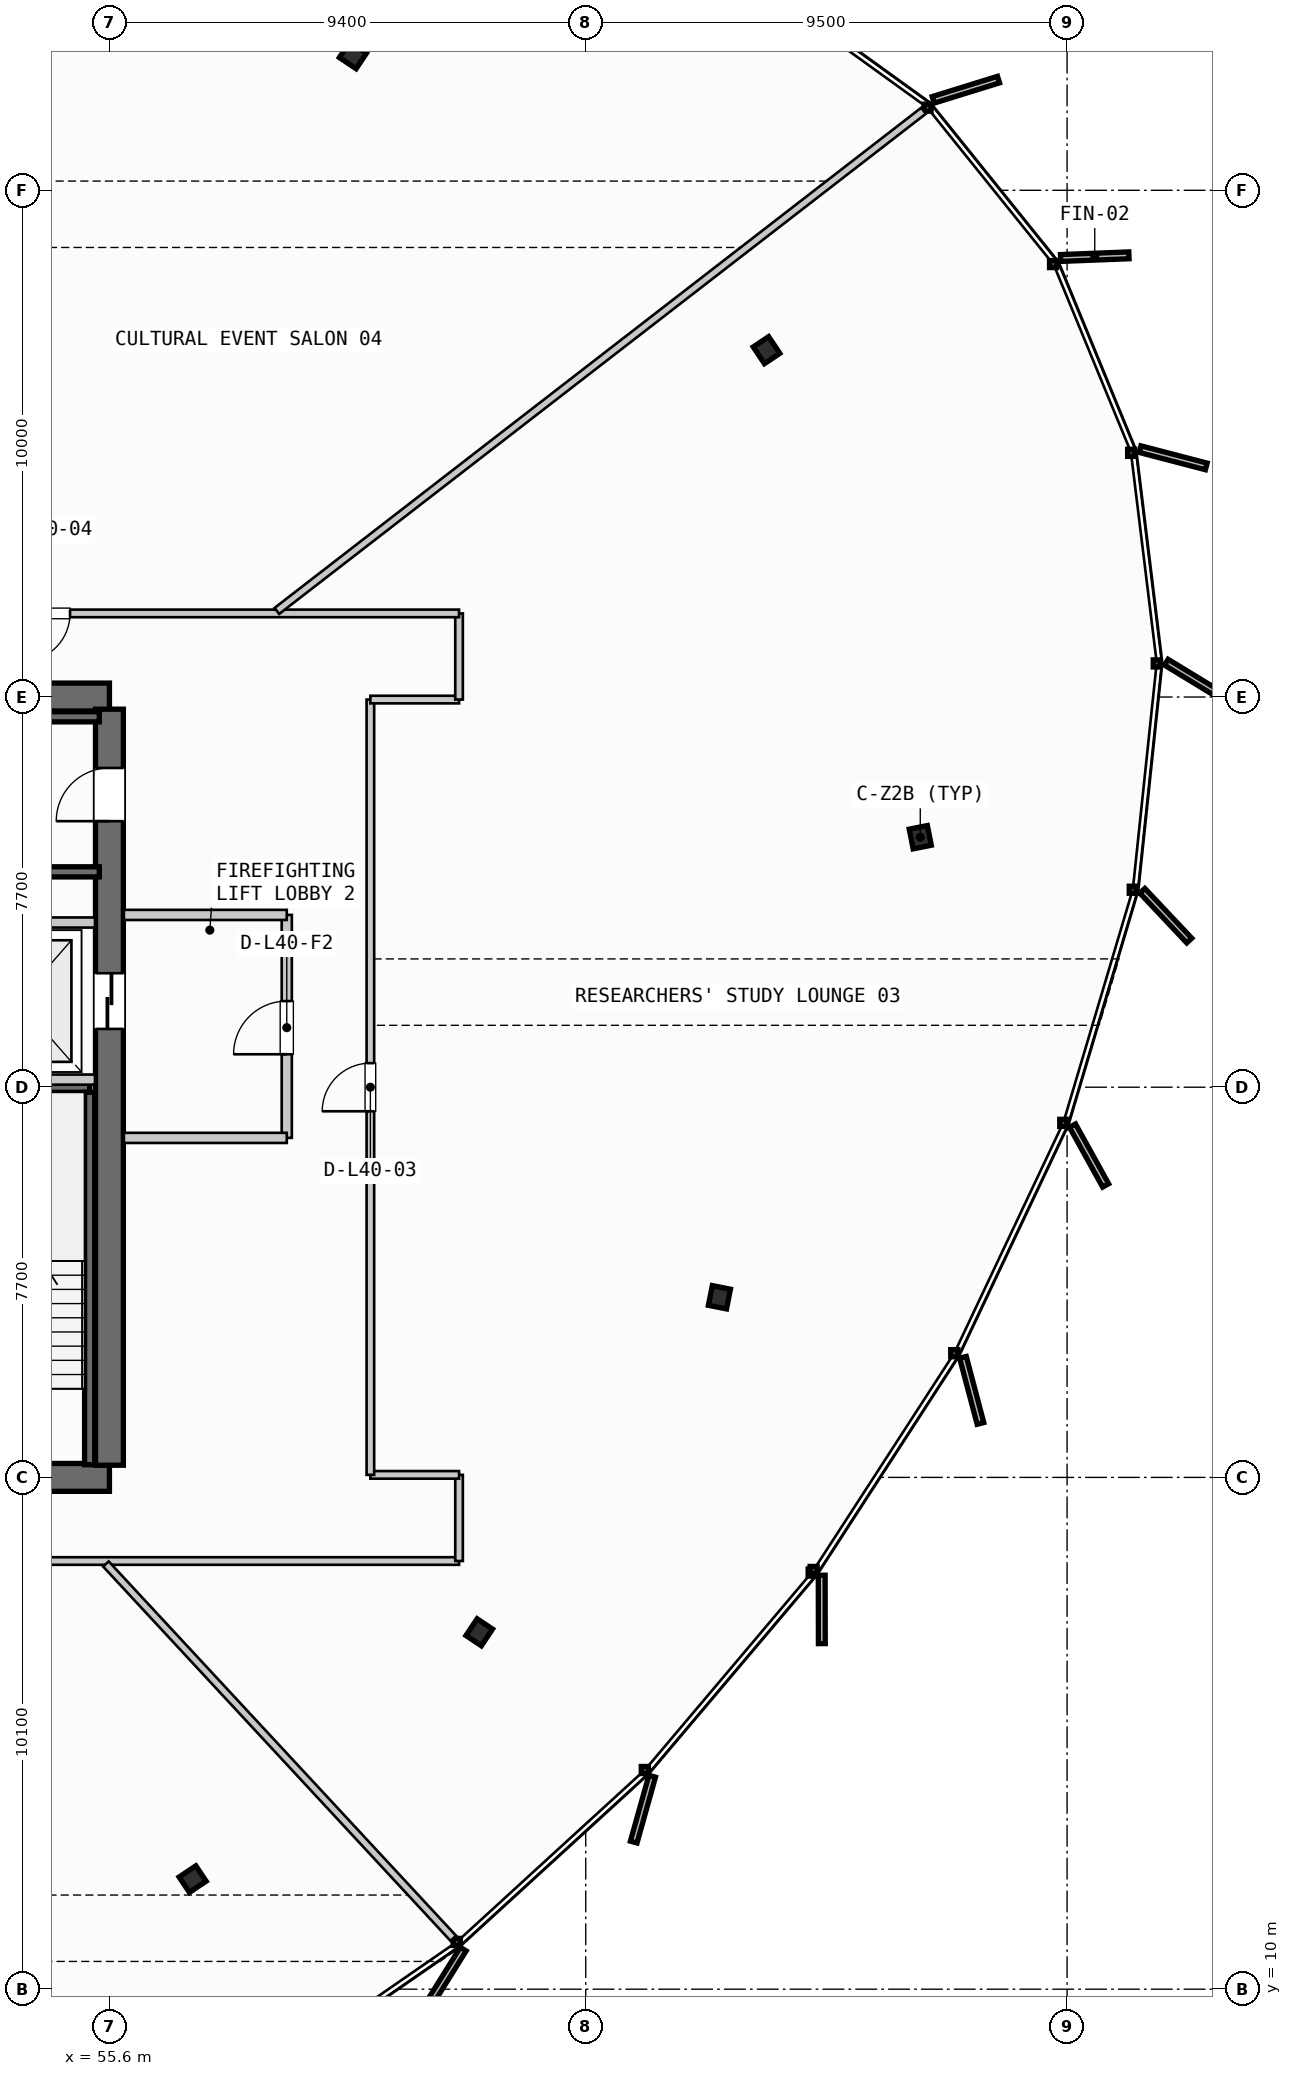
"""IFC4 building model, lengths in metres.
Left out: names, types, materials, properties, quantities, classifications, styles, units other than length and angle.
Written with IfcOpenShell. Run it as: python <this file> out.ifc"""

import sys

from ifc_helpers import new_model, si_unit, direction, frame, frame_2d, origin, origin_2d, place, context, subcontext, project, spatial, rectangle, i_section, extrude, source, transform, mapped, element, fill, save


model = new_model("IFC4")
c1 = context("Model", 3, precision=1e-05, world=origin(), true_north=direction((0.0, 1.0)))
c2 = subcontext(c1, "Body", "Model", "MODEL_VIEW")
j1 = project(units=[si_unit("LENGTHUNIT", "METRE"), si_unit("PLANEANGLEUNIT", "RADIAN")], contexts=[c1])
p1 = place(None, origin())
s1 = spatial("IfcSite", under=j1, at=p1, CompositionType="ELEMENT")
p2 = place(p1, origin())
s2 = spatial("IfcBuilding", under=s1, at=p2, CompositionType="ELEMENT")
p3 = place(p2, frame((0.0, 0.0, 157.2)))
s3 = spatial("IfcBuildingStorey", under=s2, at=p3, CompositionType="ELEMENT", Elevation=157.2)
p4 = place(p3, frame((38.0, 20.1, 0.0), z_axis=(0.0, 0.0, 1.0), x_axis=(1.0, 0.0, 0.0)))
e1 = element("IfcWall", 1, at=p4, inside=s3, PredefinedType="SHEAR", context=c2, shape_type="SweptSolid", body=[
    extrude(rectangle(XDim=17.6, YDim=0.55, at=frame_2d((8.8, 0.0))), origin(), (0.0, 0.0, 1.0), 3.3),
])
p5 = place(p4, frame((1.4, 0.0, 0.0)))
e2 = element("IfcOpeningElement", 2, at=p5, cuts=e1, PredefinedType="OPENING", context=c2, shape_type="SweptSolid", body=[
    extrude(rectangle(XDim=1.05, YDim=2.15, at=frame_2d((0.525, 1.075))), frame((0.0, 0.285, 0.0), z_axis=(0.0, -1.0, 0.0), x_axis=(1.0, 0.0, 0.0)), (0.0, 0.0, 1.0), 0.57),
])
p6 = place(p4, frame((15.15, 0.0, 0.0)))
e3 = element("IfcOpeningElement", 3, at=p6, cuts=e1, PredefinedType="OPENING", context=c2, shape_type="SweptSolid", body=[
    extrude(rectangle(XDim=1.05, YDim=2.15, at=frame_2d((0.525, 1.075))), frame((0.0, 0.285, 0.0), z_axis=(0.0, -1.0, 0.0), x_axis=(1.0, 0.0, 0.0)), (0.0, 0.0, 1.0), 0.57),
])
p7 = place(p4, frame((5.25, 0.0, 0.0)))
e4 = element("IfcOpeningElement", 4, at=p7, cuts=e1, PredefinedType="OPENING", context=c2, shape_type="SweptSolid", body=[
    extrude(rectangle(XDim=0.95, YDim=2.15, at=frame_2d((0.475, 1.075))), frame((0.0, 0.285, 0.0), z_axis=(0.0, -1.0, 0.0), x_axis=(1.0, 0.0, 0.0)), (0.0, 0.0, 1.0), 0.57),
])
p8 = place(p4, frame((11.4, 0.0, 0.0)))
e5 = element("IfcOpeningElement", 5, at=p8, cuts=e1, PredefinedType="OPENING", context=c2, shape_type="SweptSolid", body=[
    extrude(rectangle(XDim=0.95, YDim=2.15, at=frame_2d((0.475, 1.075))), frame((0.0, 0.285, 0.0), z_axis=(0.0, -1.0, 0.0), x_axis=(1.0, 0.0, 0.0)), (0.0, 0.0, 1.0), 0.57),
])
p9 = place(p3, frame((55.6, 35.5, 0.0), z_axis=(0.0, 0.0, 1.0), x_axis=(-1.0, 0.0, 0.0)))
e6 = element("IfcWall", 6, at=p9, inside=s3, PredefinedType="SHEAR", context=c2, shape_type="SweptSolid", body=[
    extrude(rectangle(XDim=17.6, YDim=0.55, at=frame_2d((8.8, 0.0))), origin(), (0.0, 0.0, 1.0), 3.3),
])
p10 = place(p9, frame((8.05, 0.0, 0.0)))
e7 = element("IfcOpeningElement", 7, at=p10, cuts=e6, PredefinedType="OPENING", context=c2, shape_type="SweptSolid", body=[
    extrude(rectangle(XDim=1.5, YDim=2.2, at=frame_2d((0.75, 1.1))), frame((0.0, 0.285, 0.0), z_axis=(0.0, -1.0, 0.0), x_axis=(1.0, 0.0, 0.0)), (0.0, 0.0, 1.0), 0.57),
])
p11 = place(p9, frame((14.95, 0.0, 0.0)))
e8 = element("IfcOpeningElement", 8, at=p11, cuts=e6, PredefinedType="OPENING", context=c2, shape_type="SweptSolid", body=[
    extrude(rectangle(XDim=1.4, YDim=2.3, at=frame_2d((0.7, 1.15))), frame((0.0, 0.285, 0.0), z_axis=(0.0, -1.0, 0.0), x_axis=(1.0, 0.0, 0.0)), (0.0, 0.0, 1.0), 0.57),
])
p12 = place(p9, frame((12.6, 0.0, 0.0)))
e9 = element("IfcOpeningElement", 9, at=p12, cuts=e6, PredefinedType="OPENING", context=c2, shape_type="SweptSolid", body=[
    extrude(rectangle(XDim=0.95, YDim=2.15, at=frame_2d((0.475, 1.075))), frame((0.0, 0.285, 0.0), z_axis=(0.0, -1.0, 0.0), x_axis=(1.0, 0.0, 0.0)), (0.0, 0.0, 1.0), 0.57),
])
p13 = place(p9, frame((10.45, 0.0, 0.0)))
e10 = element("IfcOpeningElement", 10, at=p13, cuts=e6, PredefinedType="OPENING", context=c2, shape_type="SweptSolid", body=[
    extrude(rectangle(XDim=0.95, YDim=2.15, at=frame_2d((0.475, 1.075))), frame((0.0, 0.285, 0.0), z_axis=(0.0, -1.0, 0.0), x_axis=(1.0, 0.0, 0.0)), (0.0, 0.0, 1.0), 0.57),
])
p14 = place(p3, frame((55.6, 20.34, 0.0), z_axis=(0.0, 0.0, 1.0), x_axis=(0.0, 1.0, 0.0)))
e11 = element("IfcWall", 11, at=p14, inside=s3, PredefinedType="SHEAR", context=c2, shape_type="SweptSolid", body=[
    extrude(rectangle(XDim=14.92, YDim=0.55, at=frame_2d((7.46, 0.0))), origin(), (0.0, 0.0, 1.0), 3.3),
])
p15 = place(p14, frame((12.71, 0.0, 0.0)))
e12 = element("IfcOpeningElement", 12, at=p15, cuts=e11, PredefinedType="OPENING", context=c2, shape_type="SweptSolid", body=[
    extrude(rectangle(XDim=1.05, YDim=2.15, at=frame_2d((0.525, 1.075))), frame((0.0, 0.285, 0.0), z_axis=(0.0, -1.0, 0.0), x_axis=(1.0, 0.0, 0.0)), (0.0, 0.0, 1.0), 0.57),
])
p16 = place(p14, frame((8.61, 0.0, 0.0)))
e13 = element("IfcOpeningElement", 13, at=p16, cuts=e11, PredefinedType="OPENING", context=c2, shape_type="SweptSolid", body=[
    extrude(rectangle(XDim=1.1, YDim=2.2, at=frame_2d((0.55, 1.1))), frame((0.0, 0.285, 0.0), z_axis=(0.0, -1.0, 0.0), x_axis=(1.0, 0.0, 0.0)), (0.0, 0.0, 1.0), 0.57),
])
m1 = source(origin(), c2, "Body", "SweptSolid", [
    extrude(i_section(OverallWidth=0.397, OverallDepth=0.365, WebThickness=0.028, FlangeThickness=0.044, FilletRadius=0.015, at=origin_2d()), origin(), (0.0, 0.0, 1.0), 3.3),
])
for number, where, z_axis, x_axis in (
    (14, (71.603, 32.733, 0.0), (0.0, 0.0, 1.0), (0.981, 0.195, 0.0)),
    (15, (68.569, 42.345, 0.0), (0.0, 0.0, 1.0), (0.831, 0.556, 0.0)),
    (16, (60.405, 48.161, 0.0), (0.0, 0.0, 1.0), (0.556, 0.831, 0.0)),
    (17, (57.242, 12.172, 0.0), (0.0, 0.0, 1.0), (0.556, -0.831, 0.0)),
    (18, (62.899, 17.043, 0.0), (0.0, 0.0, 1.0), (0.831, -0.556, 0.0)),
    (19, (67.639, 23.655, 0.0), (0.0, 0.0, 1.0), (0.981, -0.195, 0.0)),
):
    element("IfcColumn", number, at=place(p3, frame(where, z_axis=z_axis, x_axis=x_axis)), inside=s3, PredefinedType="COLUMN", context=c2, shape_type="MappedRepresentation", body=[
        mapped(m1, transform((0.0, 0.0, 0.0), scale=1.0)),
    ])
p17 = place(p3, frame((52.15, 27.8, 0.0), z_axis=(0.0, 0.0, 1.0), x_axis=(1.0, 0.0, 0.0)))
e20 = element("IfcWall", 20, at=p17, inside=s3, PredefinedType="SHEAR", context=c2, shape_type="SweptSolid", body=[
    extrude(rectangle(XDim=3.06, YDim=0.2, at=frame_2d((1.53, 0.0))), origin(), (0.0, 0.0, 1.0), 3.3),
])
for number, where, z_axis, x_axis in (
    (21, (55.21, 27.7, 0.0), (0.0, 0.0, 1.0), (0.0, -1.0, 0.0)),
    (22, (48.05, 35.11, 0.0), (0.0, 0.0, 1.0), (1.0, 0.0, 0.0)),
    (23, (55.4, 32.05, 0.0), (0.0, 0.0, 1.0), (-1.0, 0.0, 0.0)),
):
    element("IfcWall", number, at=place(p3, frame(where, z_axis=z_axis, x_axis=x_axis)), inside=s3, PredefinedType="SHEAR", context=c2, shape_type="SweptSolid", body=[
        extrude(rectangle(XDim=7.35, YDim=0.2, at=frame_2d((3.675, 0.0))), origin(), (0.0, 0.0, 1.0), 3.3),
    ])
for number, where, z_axis, x_axis in (
    (24, (52.45, 27.95, 0.0), (0.0, 0.0, 1.0), (1.0, 0.0, 0.0)),
    (25, (52.45, 31.05, 0.0), (0.0, 0.0, 1.0), (1.0, 0.0, 0.0)),
):
    element("IfcWall", number, at=place(p3, frame(where, z_axis=z_axis, x_axis=x_axis)), inside=s3, PredefinedType="PARTITIONING", context=c2, shape_type="SweptSolid", body=[
        extrude(rectangle(XDim=2.865, YDim=0.2, at=frame_2d((1.433, 0.0))), origin(), (0.0, 0.0, 1.0), 2.28),
    ])
p18 = place(p3, frame((59.1, 26.8, 0.0), z_axis=(0.0, 0.0, 1.0), x_axis=(0.0, 1.0, 0.0)))
e26 = element("IfcWall", 26, at=p18, inside=s3, PredefinedType="PARTITIONING", context=c2, shape_type="SweptSolid", body=[
    extrude(rectangle(XDim=4.4, YDim=0.2, at=frame_2d((2.2, 0.0))), origin(), (0.0, 0.0, 1.0), 2.28),
])
p19 = place(p18, frame((1.65, 0.0, 0.0)))
e27 = element("IfcOpeningElement", 27, at=p19, cuts=e26, PredefinedType="OPENING", context=c2, shape_type="SweptSolid", body=[
    extrude(rectangle(XDim=1.05, YDim=2.15, at=frame_2d((0.525, 1.075))), frame((0.0, 0.11, 0.0), z_axis=(0.0, -1.0, 0.0), x_axis=(1.0, 0.0, 0.0)), (0.0, 0.0, 1.0), 0.22),
])
for number, where, z_axis, x_axis in (
    (28, (55.885, 26.8, 0.0), (0.0, 0.0, 1.0), (1.0, 0.0, 0.0)),
    (29, (55.885, 31.2, 0.0), (0.0, 0.0, 1.0), (1.0, 0.0, 0.0)),
):
    element("IfcWall", number, at=place(p3, frame(where, z_axis=z_axis, x_axis=x_axis)), inside=s3, PredefinedType="PARTITIONING", context=c2, shape_type="SweptSolid", body=[
        extrude(rectangle(XDim=3.215, YDim=0.2, at=frame_2d((1.607, 0.0))), origin(), (0.0, 0.0, 1.0), 2.28),
    ])
p20 = place(p3, frame((31.1, 18.45, 0.0), z_axis=(0.0, 0.0, 1.0), x_axis=(1.0, 0.0, 0.0)))
e30 = element("IfcWall", 30, at=p20, inside=s3, PredefinedType="PARTITIONING", context=c2, shape_type="SweptSolid", body=[
    extrude(rectangle(XDim=31.4, YDim=0.15, at=frame_2d((15.7, 0.0))), origin(), (0.0, 0.0, 1.0), 2.28),
])
p21 = place(p20, frame((8.074, 0.0, 0.0)))
e31 = element("IfcOpeningElement", 31, at=p21, cuts=e30, PredefinedType="OPENING", context=c2, shape_type="SweptSolid", body=[
    extrude(rectangle(XDim=0.95, YDim=2.15, at=frame_2d((0.475, 1.075))), frame((0.0, 0.085, 0.0), z_axis=(0.0, -1.0, 0.0), x_axis=(1.0, 0.0, 0.0)), (0.0, 0.0, 1.0), 0.17),
])
p22 = place(p20, frame((18.351, 0.0, 0.0)))
e32 = element("IfcOpeningElement", 32, at=p22, cuts=e30, PredefinedType="OPENING", context=c2, shape_type="SweptSolid", body=[
    extrude(rectangle(XDim=0.95, YDim=2.15, at=frame_2d((0.475, 1.075))), frame((0.0, 0.085, 0.0), z_axis=(0.0, -1.0, 0.0), x_axis=(1.0, 0.0, 0.0)), (0.0, 0.0, 1.0), 0.17),
])
p23 = place(p3, frame((62.5, 18.45, 0.0), z_axis=(0.0, 0.0, 1.0), x_axis=(0.0, 1.0, 0.0)))
e33 = element("IfcWall", 33, at=p23, inside=s3, PredefinedType="PARTITIONING", context=c2, shape_type="SweptSolid", body=[
    extrude(rectangle(XDim=1.7, YDim=0.15, at=frame_2d((0.85, 0.0))), origin(), (0.0, 0.0, 1.0), 2.28),
])
p24 = place(p3, frame((62.5, 20.15, 0.0), z_axis=(0.0, 0.0, 1.0), x_axis=(-1.0, 0.0, 0.0)))
e34 = element("IfcWall", 34, at=p24, inside=s3, PredefinedType="PARTITIONING", context=c2, shape_type="SweptSolid", body=[
    extrude(rectangle(XDim=1.75, YDim=0.15, at=frame_2d((0.875, 0.0))), origin(), (0.0, 0.0, 1.0), 2.28),
])
p25 = place(p3, frame((60.75, 20.15, 0.0), z_axis=(0.0, 0.0, 1.0), x_axis=(0.0, 1.0, 0.0)))
e35 = element("IfcWall", 35, at=p25, inside=s3, PredefinedType="PARTITIONING", context=c2, shape_type="SweptSolid", body=[
    extrude(rectangle(XDim=15.3, YDim=0.15, at=frame_2d((7.65, 0.0))), origin(), (0.0, 0.0, 1.0), 2.28),
])
p26 = place(p25, frame((7.175, 0.0, 0.0)))
e36 = element("IfcOpeningElement", 36, at=p26, cuts=e35, PredefinedType="OPENING", context=c2, shape_type="SweptSolid", body=[
    extrude(rectangle(XDim=0.95, YDim=2.15, at=frame_2d((0.475, 1.075))), frame((0.0, 0.085, 0.0), z_axis=(0.0, -1.0, 0.0), x_axis=(1.0, 0.0, 0.0)), (0.0, 0.0, 1.0), 0.17),
])
p27 = place(p3, frame((60.75, 35.45, 0.0), z_axis=(0.0, 0.0, 1.0), x_axis=(1.0, 0.0, 0.0)))
e37 = element("IfcWall", 37, at=p27, inside=s3, PredefinedType="PARTITIONING", context=c2, shape_type="SweptSolid", body=[
    extrude(rectangle(XDim=1.75, YDim=0.15, at=frame_2d((0.875, 0.0))), origin(), (0.0, 0.0, 1.0), 2.28),
])
p28 = place(p3, frame((62.5, 35.45, 0.0), z_axis=(0.0, 0.0, 1.0), x_axis=(0.0, 1.0, 0.0)))
e38 = element("IfcWall", 38, at=p28, inside=s3, PredefinedType="PARTITIONING", context=c2, shape_type="SweptSolid", body=[
    extrude(rectangle(XDim=1.7, YDim=0.15, at=frame_2d((0.85, 0.0))), origin(), (0.0, 0.0, 1.0), 2.28),
])
p29 = place(p3, frame((62.5, 37.15, 0.0), z_axis=(0.0, 0.0, 1.0), x_axis=(-1.0, 0.0, 0.0)))
e39 = element("IfcWall", 39, at=p29, inside=s3, PredefinedType="PARTITIONING", context=c2, shape_type="SweptSolid", body=[
    extrude(rectangle(XDim=31.4, YDim=0.15, at=frame_2d((15.7, 0.0))), origin(), (0.0, 0.0, 1.0), 2.28),
])
p30 = place(p29, frame((7.678, 0.0, 0.0)))
e40 = element("IfcOpeningElement", 40, at=p30, cuts=e39, PredefinedType="OPENING", context=c2, shape_type="SweptSolid", body=[
    extrude(rectangle(XDim=0.95, YDim=2.15, at=frame_2d((0.475, 1.075))), frame((0.0, 0.085, 0.0), z_axis=(0.0, -1.0, 0.0), x_axis=(1.0, 0.0, 0.0)), (0.0, 0.0, 1.0), 0.17),
])
p31 = place(p29, frame((18.151, 0.0, 0.0)))
e41 = element("IfcOpeningElement", 41, at=p31, cuts=e39, PredefinedType="OPENING", context=c2, shape_type="SweptSolid", body=[
    extrude(rectangle(XDim=0.95, YDim=2.15, at=frame_2d((0.475, 1.075))), frame((0.0, 0.085, 0.0), z_axis=(0.0, -1.0, 0.0), x_axis=(1.0, 0.0, 0.0)), (0.0, 0.0, 1.0), 0.17),
])
p32 = place(p3, frame((55.531, 18.391, 0.0), z_axis=(0.0, 0.0, 1.0), x_axis=(0.680268944675, -0.732962593119, 0.0)))
e42 = element("IfcWall", 42, at=p32, inside=s3, PredefinedType="PARTITIONING", context=c2, shape_type="SweptSolid", body=[
    extrude(rectangle(XDim=10.077, YDim=0.15, at=frame_2d((5.039, 0.0))), origin(), (0.0, 0.0, 1.0), 2.28),
])
p33 = place(p3, frame((58.905, 37.199, 0.0), z_axis=(0.0, 0.0, 1.0), x_axis=(0.791018028547, 0.611792839541, 0.0)))
e43 = element("IfcWall", 43, at=p33, inside=s3, PredefinedType="PARTITIONING", context=c2, shape_type="SweptSolid", body=[
    extrude(rectangle(XDim=16.134, YDim=0.15, at=frame_2d((8.067, 0.0))), origin(), (0.0, 0.0, 1.0), 2.28),
])
p34 = place(p3, frame((49.7, 37.226, 0.0), z_axis=(0.0, 0.0, 1.0), x_axis=(0.296377685756, 0.955070817995, 0.0)))
e44 = element("IfcWall", 44, at=p34, inside=s3, PredefinedType="PARTITIONING", context=c2, shape_type="SweptSolid", body=[
    extrude(rectangle(XDim=16.051, YDim=0.15, at=frame_2d((8.025, 0.0))), origin(), (0.0, 0.0, 1.0), 2.28),
])
m2 = source(origin(), c2, "Body", "SweptSolid", [
    extrude(rectangle(XDim=1.05, YDim=2.15, at=frame_2d((0.525, 1.075))), frame((0.0, 0.025, 0.0), z_axis=(0.0, -1.0, 0.0), x_axis=(1.0, 0.0, 0.0)), (0.0, 0.0, 1.0), 0.05),
])
p35 = place(p15, origin())
e45 = element("IfcDoor", 45, at=p35, inside=s3, OperationType="SINGLE_SWING_LEFT", PredefinedType="DOOR", context=c2, shape_type="MappedRepresentation", body=[
    mapped(m2, transform((0.0, 0.0, 0.0), scale=1.0)),
])
fill(e12, e45)
m3 = source(origin(), c2, "Body", "SweptSolid", [
    extrude(rectangle(XDim=1.1, YDim=2.2, at=frame_2d((0.55, 1.1))), frame((0.0, 0.025, 0.0), z_axis=(0.0, -1.0, 0.0), x_axis=(1.0, 0.0, 0.0)), (0.0, 0.0, 1.0), 0.05),
])
p36 = place(p16, origin())
e46 = element("IfcDoor", 46, at=p36, inside=s3, OperationType="SLIDING_TO_RIGHT", PredefinedType="DOOR", context=c2, shape_type="MappedRepresentation", body=[
    mapped(m3, transform((0.0, 0.0, 0.0), scale=1.0)),
])
fill(e13, e46)
p37 = place(p19, origin())
e47 = element("IfcDoor", 47, at=p37, inside=s3, OperationType="SINGLE_SWING_LEFT", PredefinedType="DOOR", context=c2, shape_type="MappedRepresentation", body=[
    mapped(m2, transform((0.0, 0.0, 0.0), scale=1.0)),
])
fill(e27, e47)
m4 = source(origin(), c2, "Body", "SweptSolid", [
    extrude(rectangle(XDim=0.95, YDim=2.15, at=frame_2d((0.475, 1.075))), frame((0.0, 0.025, 0.0), z_axis=(0.0, -1.0, 0.0), x_axis=(1.0, 0.0, 0.0)), (0.0, 0.0, 1.0), 0.05),
])
p38 = place(p26, origin())
e48 = element("IfcDoor", 48, at=p38, inside=s3, OperationType="SINGLE_SWING_LEFT", PredefinedType="DOOR", context=c2, shape_type="MappedRepresentation", body=[
    mapped(m4, transform((0.0, 0.0, 0.0), scale=1.0)),
])
fill(e36, e48)
p39 = place(p30, origin())
e49 = element("IfcDoor", 49, at=p39, inside=s3, OperationType="SINGLE_SWING_RIGHT", PredefinedType="DOOR", context=c2, shape_type="MappedRepresentation", body=[
    mapped(m4, transform((0.0, 0.0, 0.0), scale=1.0)),
])
fill(e40, e49)
save(model, sys.argv[1])
